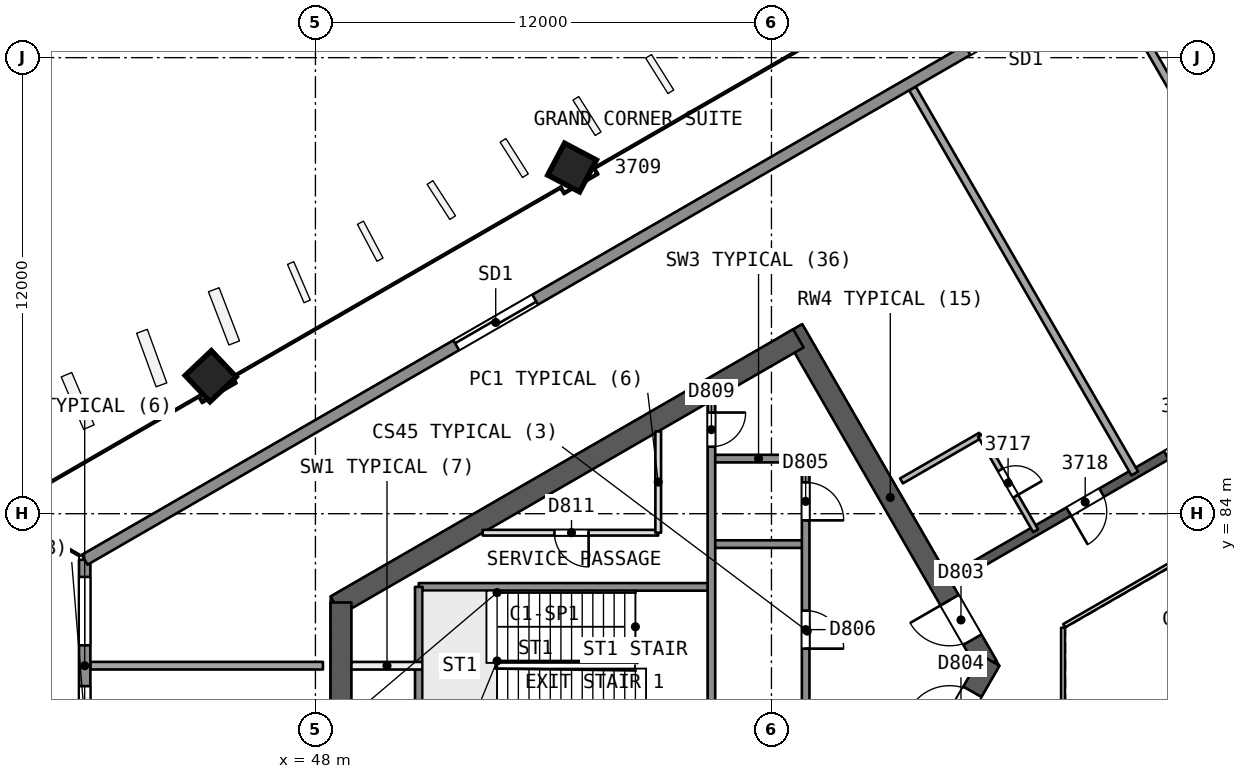
"""IFC4 building model, lengths in metres.
Left out: names, types, materials, properties, quantities, classifications, styles, units other than length and angle.
Written with IfcOpenShell. Run it as: python <this file> out.ifc"""

import sys

from ifc_helpers import new_model, si_unit, direction, frame, frame_2d, origin, origin_2d, place, context, subcontext, project, spatial, rectangle, extrude, element, fill, save


model = new_model("IFC4")
c1 = context("Model", 3, precision=1e-05, world=origin(), true_north=direction((0.0, 1.0)))
c2 = subcontext(c1, "Body", "Model", "MODEL_VIEW")
j1 = project(units=[si_unit("LENGTHUNIT", "METRE"), si_unit("PLANEANGLEUNIT", "RADIAN")], contexts=[c1])
p1 = place(None, origin())
s1 = spatial("IfcSite", under=j1, at=p1, CompositionType="ELEMENT")
p2 = place(p1, origin())
s2 = spatial("IfcBuilding", under=s1, at=p2, CompositionType="ELEMENT")
p3 = place(p2, frame((0.0, 0.0, 156.3)))
s3 = spatial("IfcBuildingStorey", under=s2, at=p3, CompositionType="ELEMENT", Elevation=156.3)
p4 = place(p3, frame((65.682, 80.0, 0.0), z_axis=(0.0, 0.0, 1.0), x_axis=(-0.500000202252, 0.866025287014, 0.0)))
e1 = element("IfcWall", 1, at=p4, inside=s3, PredefinedType="SHEAR", context=c2, shape_type="SweptSolid", body=[
    extrude(rectangle(XDim=10.221, YDim=0.55, at=frame_2d((5.111, 0.0))), origin(), (0.0, 0.0, 1.0), 3.7),
])
p5 = place(p4, frame((0.791, 0.0, 0.0)))
e2 = element("IfcOpeningElement", 2, at=p5, cuts=e1, PredefinedType="OPENING", context=c2, shape_type="SweptSolid", body=[
    extrude(rectangle(XDim=1.2, YDim=2.1, at=frame_2d((0.6, 1.05))), frame((0.0, 0.286, 0.0), z_axis=(0.0, -1.0, 0.0), x_axis=(1.0, 0.0, 0.0)), (0.0, 0.0, 1.0), 0.571),
])
p6 = place(p3, frame((60.709, 88.614, 0.0), z_axis=(0.0, 0.0, 1.0), x_axis=(-0.866020164116, -0.500009075263, 0.0)))
e3 = element("IfcWall", 3, at=p6, inside=s3, PredefinedType="SHEAR", context=c2, shape_type="SweptSolid", body=[
    extrude(rectangle(XDim=14.058, YDim=0.55, at=frame_2d((7.029, 0.0))), origin(), (0.0, 0.0, 1.0), 3.7),
])
p7 = place(p3, frame((48.672, 81.664, 0.0), z_axis=(0.0, 0.0, 1.0), x_axis=(0.0, -1.0, 0.0)))
e4 = element("IfcWall", 4, at=p7, inside=s3, PredefinedType="SHEAR", context=c2, shape_type="SweptSolid", body=[
    extrude(rectangle(XDim=3.487, YDim=0.55, at=frame_2d((1.743, 0.0))), origin(), (0.0, 0.0, 1.0), 3.7),
])
p8 = place(p3, frame((60.709, 71.386, 0.0), z_axis=(0.0, 0.0, 1.0), x_axis=(0.500015938302, 0.866016201606, 0.0)))
e5 = element("IfcWall", 5, at=p8, inside=s3, PredefinedType="SHEAR", context=c2, shape_type="SweptSolid", body=[
    extrude(rectangle(XDim=10.105, YDim=0.55, at=frame_2d((5.053, 0.0))), origin(), (0.0, 0.0, 1.0), 3.7),
])
p9 = place(p8, frame((7.955, 0.0, 0.0)))
e6 = element("IfcOpeningElement", 6, at=p9, cuts=e5, PredefinedType="OPENING", context=c2, shape_type="SweptSolid", body=[
    extrude(rectangle(XDim=1.2, YDim=2.1, at=frame_2d((0.6, 1.05))), frame((0.0, 0.286, 0.0), z_axis=(0.0, -1.0, 0.0), x_axis=(1.0, 0.0, 0.0)), (0.0, 0.0, 1.0), 0.571),
])
p10 = place(p3, frame((78.2, 90.046, 0.0), z_axis=(0.0, 0.0, 1.0), x_axis=(-0.866026492143, -0.499998114903, 0.0)))
e7 = element("IfcWall", 7, at=p10, inside=s3, PredefinedType="SHEAR", context=c2, shape_type="SweptSolid", body=[
    extrude(rectangle(XDim=15.588, YDim=0.25, at=frame_2d((7.794, 0.0))), origin(), (0.0, 0.0, 1.0), 3.25),
])
p11 = place(p10, frame((1.527, 0.0, 0.0)))
e8 = element("IfcOpeningElement", 8, at=p11, cuts=e7, PredefinedType="OPENING", context=c2, shape_type="SweptSolid", body=[
    extrude(rectangle(XDim=1.0, YDim=2.1, at=frame_2d((0.5, 1.05))), frame((0.0, 0.135, 0.0), z_axis=(0.0, -1.0, 0.0), x_axis=(1.0, 0.0, 0.0)), (0.0, 0.0, 1.0), 0.271),
])
p12 = place(p10, frame((7.915, 0.0, 0.0)))
e9 = element("IfcOpeningElement", 9, at=p12, cuts=e7, PredefinedType="OPENING", context=c2, shape_type="SweptSolid", body=[
    extrude(rectangle(XDim=1.1, YDim=2.1, at=frame_2d((0.55, 1.05))), frame((0.0, 0.135, 0.0), z_axis=(0.0, -1.0, 0.0), x_axis=(1.0, 0.0, 0.0)), (0.0, 0.0, 1.0), 0.271),
])
p13 = place(p10, frame((10.982, 0.0, 0.0)))
e10 = element("IfcOpeningElement", 10, at=p13, cuts=e7, PredefinedType="OPENING", context=c2, shape_type="SweptSolid", body=[
    extrude(rectangle(XDim=1.0, YDim=2.1, at=frame_2d((0.5, 1.05))), frame((0.0, 0.135, 0.0), z_axis=(0.0, -1.0, 0.0), x_axis=(1.0, 0.0, 0.0)), (0.0, 0.0, 1.0), 0.271),
])
p14 = place(p3, frame((54.73, 93.123, 0.0), z_axis=(0.019262573858, -0.012138060239, 0.999740776773), x_axis=(-0.498866616408, 0.866444929774, 0.020131634383)))
e11 = element("IfcColumn", 11, at=p14, inside=s3, PredefinedType="COLUMN", context=c2, shape_type="SweptSolid", body=[
    extrude(rectangle(XDim=0.95, YDim=0.95, at=origin_2d()), origin(), (0.0, 0.0, 1.0), 3.701),
])
p15 = place(p3, frame((45.209, 87.626, 0.0), z_axis=(0.02855911485, -0.006793507689, 0.999569019734), x_axis=(-0.50039805324, 0.86556025987, 0.020179812855)))
e12 = element("IfcColumn", 12, at=p15, inside=s3, PredefinedType="COLUMN", context=c2, shape_type="SweptSolid", body=[
    extrude(rectangle(XDim=0.95, YDim=0.95, at=origin_2d()), origin(), (0.0, 0.0, 1.0), 3.702),
])
for number, where, z_axis, x_axis in (
    (13, (68.839, 98.153, 0.0), (0.0, 0.0, 1.0), (0.5, -0.866, 0.0)),
    (14, (63.709, 95.191, 0.0), (0.0, 0.0, 1.0), (0.5, -0.866, 0.0)),
):
    element("IfcWall", number, at=place(p3, frame(where, z_axis=z_axis, x_axis=x_axis)), inside=s3, PredefinedType="PARTITIONING", context=c2, shape_type="SweptSolid", body=[
        extrude(rectangle(XDim=11.701, YDim=0.2, at=frame_2d((5.851, 0.0))), origin(), (0.0, 0.0, 1.0), 3.25),
    ])
p16 = place(p3, frame((63.422, 84.863, 0.0), z_axis=(0.0, 0.0, 1.0), x_axis=(0.865994240961, 0.500053971709, 0.0)))
e15 = element("IfcWall", 15, at=p16, inside=s3, PredefinedType="PARTITIONING", context=c2, shape_type="SweptSolid", body=[
    extrude(rectangle(XDim=2.401, YDim=0.15, at=frame_2d((1.201, 0.0))), origin(), (0.0, 0.0, 1.0), 3.25),
])
p17 = place(p3, frame((65.502, 86.063, 0.0), z_axis=(0.0, 0.0, 1.0), x_axis=(0.499987231761, -0.866032775405, 0.0)))
e16 = element("IfcWall", 16, at=p17, inside=s3, PredefinedType="PARTITIONING", context=c2, shape_type="SweptSolid", body=[
    extrude(rectangle(XDim=2.9, YDim=0.15, at=frame_2d((1.45, 0.0))), origin(), (0.0, 0.0, 1.0), 3.25),
])
p18 = place(p17, frame((1.05, 0.0, 0.0)))
e17 = element("IfcOpeningElement", 17, at=p18, cuts=e16, PredefinedType="OPENING", context=c2, shape_type="SweptSolid", body=[
    extrude(rectangle(XDim=0.8, YDim=2.1, at=frame_2d((0.4, 1.05))), frame((0.0, 0.085, 0.0), z_axis=(0.0, -1.0, 0.0), x_axis=(1.0, 0.0, 0.0)), (0.0, 0.0, 1.0), 0.171),
])
p19 = place(p3, frame((42.077, 80.001, 0.0), z_axis=(0.0, 0.0, 1.0), x_axis=(1.0, 0.0, 0.0)))
e18 = element("IfcWall", 18, at=p19, inside=s3, PredefinedType="PARTITIONING", context=c2, shape_type="SweptSolid", body=[
    extrude(rectangle(XDim=6.121, YDim=0.2, at=frame_2d((3.06, 0.0))), origin(), (0.0, 0.0, 1.0), 3.25),
])
p20 = place(p3, frame((41.928, 77.212, 0.0), z_axis=(0.0, 0.0, 1.0), x_axis=(0.0, 1.0, 0.0)))
e19 = element("IfcWall", 19, at=p20, inside=s3, PredefinedType="SOLIDWALL", context=c2, shape_type="SweptSolid", body=[
    extrude(rectangle(XDim=5.576, YDim=0.3, at=frame_2d((2.788, 0.0))), origin(), (0.0, 0.0, 1.0), 3.25),
])
p21 = place(p20, frame((0.451, 0.0, 0.9)))
e20 = element("IfcOpeningElement", 20, at=p21, cuts=e19, PredefinedType="OPENING", context=c2, shape_type="SweptSolid", body=[
    extrude(rectangle(XDim=1.8, YDim=1.5, at=frame_2d((0.9, 0.75))), frame((0.0, 0.161, 0.0), z_axis=(0.0, -1.0, 0.0), x_axis=(1.0, 0.0, 0.0)), (0.0, 0.0, 1.0), 0.321),
])
p22 = place(p20, frame((3.324, 0.0, 0.9)))
e21 = element("IfcOpeningElement", 21, at=p22, cuts=e19, PredefinedType="OPENING", context=c2, shape_type="SweptSolid", body=[
    extrude(rectangle(XDim=1.8, YDim=1.5, at=frame_2d((0.9, 0.75))), frame((0.0, 0.161, 0.0), z_axis=(0.0, -1.0, 0.0), x_axis=(1.0, 0.0, 0.0)), (0.0, 0.0, 1.0), 0.321),
])
p23 = place(p3, frame((41.928, 82.788, 0.0), z_axis=(0.0, 0.0, 1.0), x_axis=(0.866025629663, 0.499999608766, 0.0)))
e22 = element("IfcWall", 22, at=p23, inside=s3, PredefinedType="SOLIDWALL", context=c2, shape_type="SweptSolid", body=[
    extrude(rectangle(XDim=54.494, YDim=0.3, at=frame_2d((27.247, 0.0))), origin(), (0.0, 0.0, 1.0), 3.25),
])
p24 = place(p23, frame((26.826, 0.0, 0.0)))
e23 = element("IfcOpeningElement", 23, at=p24, cuts=e22, PredefinedType="OPENING", context=c2, shape_type="SweptSolid", body=[
    extrude(rectangle(XDim=2.4, YDim=2.4, at=frame_2d((1.2, 1.2))), frame((0.0, 0.161, 0.0), z_axis=(0.0, -1.0, 0.0), x_axis=(1.0, 0.0, 0.0)), (0.0, 0.0, 1.0), 0.321),
])
p25 = place(p23, frame((31.815, 0.0, 0.0)))
e24 = element("IfcOpeningElement", 24, at=p25, cuts=e22, PredefinedType="OPENING", context=c2, shape_type="SweptSolid", body=[
    extrude(rectangle(XDim=2.4, YDim=2.4, at=frame_2d((1.2, 1.2))), frame((0.0, 0.161, 0.0), z_axis=(0.0, -1.0, 0.0), x_axis=(1.0, 0.0, 0.0)), (0.0, 0.0, 1.0), 0.321),
])
p26 = place(p23, frame((42.339, 0.0, 0.0)))
e25 = element("IfcOpeningElement", 25, at=p26, cuts=e22, PredefinedType="OPENING", context=c2, shape_type="SweptSolid", body=[
    extrude(rectangle(XDim=2.4, YDim=2.4, at=frame_2d((1.2, 1.2))), frame((0.0, 0.161, 0.0), z_axis=(0.0, -1.0, 0.0), x_axis=(1.0, 0.0, 0.0)), (0.0, 0.0, 1.0), 0.321),
])
p27 = place(p23, frame((11.289, 0.0, 0.0)))
e26 = element("IfcOpeningElement", 26, at=p27, cuts=e22, PredefinedType="OPENING", context=c2, shape_type="SweptSolid", body=[
    extrude(rectangle(XDim=2.4, YDim=2.4, at=frame_2d((1.2, 1.2))), frame((0.0, 0.161, 0.0), z_axis=(0.0, -1.0, 0.0), x_axis=(1.0, 0.0, 0.0)), (0.0, 0.0, 1.0), 0.321),
])
p28 = place(p3, frame((60.9, 85.45, 0.0), z_axis=(0.0, 0.0, 1.0), x_axis=(-1.0, 0.0, 0.0)))
e27 = element("IfcWall", 27, at=p28, inside=s3, PredefinedType="SOLIDWALL", context=c2, shape_type="SweptSolid", body=[
    extrude(rectangle(XDim=2.48, YDim=0.2, at=frame_2d((1.24, 0.0))), origin(), (0.0, 0.0, 1.0), 3.25),
])
p29 = place(p3, frame((57.02, 83.5, 0.0), z_axis=(0.0, 0.0, 1.0), x_axis=(-1.0, 0.0, 0.0)))
e28 = element("IfcWall", 28, at=p29, inside=s3, PredefinedType="PARTITIONING", context=c2, shape_type="SweptSolid", body=[
    extrude(rectangle(XDim=4.618, YDim=0.15, at=frame_2d((2.309, 0.0))), origin(), (0.0, 0.0, 1.0), 3.25),
])
p30 = place(p29, frame((1.832, 0.0, 0.0)))
e29 = element("IfcOpeningElement", 29, at=p30, cuts=e28, PredefinedType="OPENING", context=c2, shape_type="SweptSolid", body=[
    extrude(rectangle(XDim=0.9, YDim=2.1, at=frame_2d((0.45, 1.05))), frame((0.0, 0.085, 0.0), z_axis=(0.0, -1.0, 0.0), x_axis=(1.0, 0.0, 0.0)), (0.0, 0.0, 1.0), 0.171),
])
p31 = place(p3, frame((60.9, 83.2, 0.0), z_axis=(0.0, 0.0, 1.0), x_axis=(-1.0, 0.0, 0.0)))
e30 = element("IfcWall", 30, at=p31, inside=s3, PredefinedType="SOLIDWALL", context=c2, shape_type="SweptSolid", body=[
    extrude(rectangle(XDim=2.48, YDim=0.2, at=frame_2d((1.24, 0.0))), origin(), (0.0, 0.0, 1.0), 3.25),
])
p32 = place(p3, frame((58.42, 82.075, 0.0), z_axis=(0.0, 0.0, 1.0), x_axis=(-1.0, 0.0, 0.0)))
e31 = element("IfcWall", 31, at=p32, inside=s3, PredefinedType="SOLIDWALL", context=c2, shape_type="SweptSolid", body=[
    extrude(rectangle(XDim=7.7, YDim=0.2, at=frame_2d((3.85, 0.0))), origin(), (0.0, 0.0, 1.0), 3.25),
])
p33 = place(p3, frame((50.82, 80.0, 0.0), z_axis=(0.0, 0.0, 1.0), x_axis=(-1.0, 0.0, 0.0)))
e32 = element("IfcWall", 32, at=p33, inside=s3, PredefinedType="PARTITIONING", context=c2, shape_type="SweptSolid", body=[
    extrude(rectangle(XDim=1.873, YDim=0.2, at=frame_2d((0.937, 0.0))), origin(), (0.0, 0.0, 1.0), 3.25),
])
p34 = place(p3, frame((60.9, 85.45, 0.0), z_axis=(0.0, 0.0, 1.0), x_axis=(0.0, -1.0, 0.0)))
e33 = element("IfcWall", 33, at=p34, inside=s3, PredefinedType="SOLIDWALL", context=c2, shape_type="SweptSolid", body=[
    extrude(rectangle(XDim=10.9, YDim=0.2, at=frame_2d((5.45, 0.0))), origin(), (0.0, 0.0, 1.0), 3.25),
])
p35 = place(p34, frame((0.625, 0.0, 0.0)))
e34 = element("IfcOpeningElement", 34, at=p35, cuts=e33, PredefinedType="OPENING", context=c2, shape_type="SweptSolid", body=[
    extrude(rectangle(XDim=1.0, YDim=2.1, at=frame_2d((0.5, 1.05))), frame((0.0, 0.11, 0.0), z_axis=(0.0, -1.0, 0.0), x_axis=(1.0, 0.0, 0.0)), (0.0, 0.0, 1.0), 0.221),
])
p36 = place(p34, frame((4.0, 0.0, 0.0)))
e35 = element("IfcOpeningElement", 35, at=p36, cuts=e33, PredefinedType="OPENING", context=c2, shape_type="SweptSolid", body=[
    extrude(rectangle(XDim=1.0, YDim=2.1, at=frame_2d((0.5, 1.05))), frame((0.0, 0.11, 0.0), z_axis=(0.0, -1.0, 0.0), x_axis=(1.0, 0.0, 0.0)), (0.0, 0.0, 1.0), 0.221),
])
p37 = place(p34, frame((7.375, 0.0, 0.0)))
e36 = element("IfcOpeningElement", 36, at=p37, cuts=e33, PredefinedType="OPENING", context=c2, shape_type="SweptSolid", body=[
    extrude(rectangle(XDim=1.0, YDim=2.1, at=frame_2d((0.5, 1.05))), frame((0.0, 0.11, 0.0), z_axis=(0.0, -1.0, 0.0), x_axis=(1.0, 0.0, 0.0)), (0.0, 0.0, 1.0), 0.221),
])
p38 = place(p3, frame((58.42, 86.974, 0.0), z_axis=(0.0, 0.0, 1.0), x_axis=(0.0, -1.0, 0.0)))
e37 = element("IfcWall", 37, at=p38, inside=s3, PredefinedType="SOLIDWALL", context=c2, shape_type="SweptSolid", body=[
    extrude(rectangle(XDim=10.524, YDim=0.2, at=frame_2d((5.262, 0.0))), origin(), (0.0, 0.0, 1.0), 3.25),
])
p39 = place(p38, frame((0.312, 0.0, 0.0)))
e38 = element("IfcOpeningElement", 38, at=p39, cuts=e37, PredefinedType="OPENING", context=c2, shape_type="SweptSolid", body=[
    extrude(rectangle(XDim=0.9, YDim=2.1, at=frame_2d((0.45, 1.05))), frame((0.0, 0.11, 0.0), z_axis=(0.0, -1.0, 0.0), x_axis=(1.0, 0.0, 0.0)), (0.0, 0.0, 1.0), 0.221),
])
p40 = place(p3, frame((57.02, 86.166, 0.0), z_axis=(0.0, 0.0, 1.0), x_axis=(0.0, -1.0, 0.0)))
e39 = element("IfcWall", 39, at=p40, inside=s3, PredefinedType="PARTITIONING", context=c2, shape_type="SweptSolid", body=[
    extrude(rectangle(XDim=2.666, YDim=0.15, at=frame_2d((1.333, 0.0))), origin(), (0.0, 0.0, 1.0), 3.25),
])
p41 = place(p3, frame((50.72, 82.075, 0.0), z_axis=(0.0, 0.0, 1.0), x_axis=(0.0, -1.0, 0.0)))
e40 = element("IfcWall", 40, at=p41, inside=s3, PredefinedType="SOLIDWALL", context=c2, shape_type="SweptSolid", body=[
    extrude(rectangle(XDim=4.15, YDim=0.2, at=frame_2d((2.075, 0.0))), origin(), (0.0, 0.0, 1.0), 3.25),
])
p42 = place(p3, frame((77.738, 86.846, 0.0), z_axis=(0.0, 0.0, 1.0), x_axis=(-0.866026658274, -0.499997827154, 0.0)))
e41 = element("IfcWall", 41, at=p42, inside=s3, PredefinedType="PARTITIONING", context=c2, shape_type="SweptSolid", body=[
    extrude(rectangle(XDim=11.588, YDim=0.1, at=frame_2d((5.794, 0.0))), origin(), (0.0, 0.0, 1.0), 3.25),
])
p43 = place(p3, frame((67.672, 81.0, 0.0), z_axis=(0.0, 0.0, 1.0), x_axis=(0.0, -1.0, 0.0)))
e42 = element("IfcWall", 42, at=p43, inside=s3, PredefinedType="PARTITIONING", context=c2, shape_type="SweptSolid", body=[
    extrude(rectangle(XDim=2.0, YDim=0.1, at=frame_2d((1.0, 0.0))), origin(), (0.0, 0.0, 1.0), 3.25),
])
p44 = place(p12, origin())
e43 = element("IfcDoor", 43, at=p44, inside=s3, OperationType="SINGLE_SWING_RIGHT", PredefinedType="NOTDEFINED", context=c2, shape_type="SweptSolid", body=[
    extrude(rectangle(XDim=1.1, YDim=2.1, at=frame_2d((0.55, 1.05))), frame((0.0, 0.025, 0.0), z_axis=(0.0, -1.0, 0.0), x_axis=(1.0, 0.0, 0.0)), (0.0, 0.0, 1.0), 0.05),
])
fill(e9, e43)
p45 = place(p18, origin())
e44 = element("IfcDoor", 44, at=p45, inside=s3, OperationType="SINGLE_SWING_RIGHT", PredefinedType="NOTDEFINED", context=c2, shape_type="SweptSolid", body=[
    extrude(rectangle(XDim=0.8, YDim=2.1, at=frame_2d((0.4, 1.05))), frame((0.0, 0.025, 0.0), z_axis=(0.0, -1.0, 0.0), x_axis=(1.0, 0.0, 0.0)), (0.0, 0.0, 1.0), 0.05),
])
fill(e17, e44)
p46 = place(p13, origin())
e45 = element("IfcDoor", 45, at=p46, inside=s3, OperationType="SINGLE_SWING_RIGHT", PredefinedType="NOTDEFINED", context=c2, shape_type="SweptSolid", body=[
    extrude(rectangle(XDim=1.0, YDim=2.1, at=frame_2d((0.5, 1.05))), frame((0.0, 0.025, 0.0), z_axis=(0.0, -1.0, 0.0), x_axis=(1.0, 0.0, 0.0)), (0.0, 0.0, 1.0), 0.05),
])
fill(e10, e45)
p47 = place(p21, origin())
e46 = element("IfcWindow", 46, at=p47, inside=s3, PartitioningType="SINGLE_PANEL", PredefinedType="WINDOW", context=c2, shape_type="SweptSolid", body=[
    extrude(rectangle(XDim=1.8, YDim=1.5, at=frame_2d((0.9, 0.75))), frame((0.0, 0.03, 0.0), z_axis=(0.0, -1.0, 0.0), x_axis=(1.0, 0.0, 0.0)), (0.0, 0.0, 1.0), 0.06),
])
fill(e20, e46)
p48 = place(p22, origin())
e47 = element("IfcWindow", 47, at=p48, inside=s3, PartitioningType="SINGLE_PANEL", PredefinedType="WINDOW", context=c2, shape_type="SweptSolid", body=[
    extrude(rectangle(XDim=1.8, YDim=1.5, at=frame_2d((0.9, 0.75))), frame((0.0, 0.03, 0.0), z_axis=(0.0, -1.0, 0.0), x_axis=(1.0, 0.0, 0.0)), (0.0, 0.0, 1.0), 0.06),
])
fill(e21, e47)
p49 = place(p27, origin())
e48 = element("IfcDoor", 48, at=p49, inside=s3, OperationType="SLIDING_TO_RIGHT", PredefinedType="NOTDEFINED", context=c2, shape_type="SweptSolid", body=[
    extrude(rectangle(XDim=2.4, YDim=2.4, at=frame_2d((1.2, 1.2))), frame((0.0, 0.025, 0.0), z_axis=(0.0, -1.0, 0.0), x_axis=(1.0, 0.0, 0.0)), (0.0, 0.0, 1.0), 0.05),
])
fill(e26, e48)
p50 = place(p5, origin())
e49 = element("IfcDoor", 49, at=p50, inside=s3, OperationType="SINGLE_SWING_RIGHT", PredefinedType="NOTDEFINED", context=c2, shape_type="SweptSolid", body=[
    extrude(rectangle(XDim=1.2, YDim=2.1, at=frame_2d((0.6, 1.05))), frame((0.0, 0.025, 0.0), z_axis=(0.0, -1.0, 0.0), x_axis=(1.0, 0.0, 0.0)), (0.0, 0.0, 1.0), 0.05),
])
fill(e2, e49)
p51 = place(p9, origin())
e50 = element("IfcDoor", 50, at=p51, inside=s3, OperationType="SINGLE_SWING_LEFT", PredefinedType="NOTDEFINED", context=c2, shape_type="SweptSolid", body=[
    extrude(rectangle(XDim=1.2, YDim=2.1, at=frame_2d((0.6, 1.05))), frame((0.0, 0.025, 0.0), z_axis=(0.0, -1.0, 0.0), x_axis=(1.0, 0.0, 0.0)), (0.0, 0.0, 1.0), 0.05),
])
fill(e6, e50)
p52 = place(p35, origin())
e51 = element("IfcDoor", 51, at=p52, inside=s3, OperationType="SINGLE_SWING_RIGHT", PredefinedType="NOTDEFINED", context=c2, shape_type="SweptSolid", body=[
    extrude(rectangle(XDim=1.0, YDim=2.1, at=frame_2d((0.5, 1.05))), frame((0.0, 0.025, 0.0), z_axis=(0.0, -1.0, 0.0), x_axis=(1.0, 0.0, 0.0)), (0.0, 0.0, 1.0), 0.05),
])
fill(e34, e51)
p53 = place(p36, origin())
e52 = element("IfcDoor", 52, at=p53, inside=s3, OperationType="SINGLE_SWING_RIGHT", PredefinedType="NOTDEFINED", context=c2, shape_type="SweptSolid", body=[
    extrude(rectangle(XDim=1.0, YDim=2.1, at=frame_2d((0.5, 1.05))), frame((0.0, 0.025, 0.0), z_axis=(0.0, -1.0, 0.0), x_axis=(1.0, 0.0, 0.0)), (0.0, 0.0, 1.0), 0.05),
])
fill(e35, e52)
p54 = place(p39, origin())
e53 = element("IfcDoor", 53, at=p54, inside=s3, OperationType="SINGLE_SWING_LEFT", PredefinedType="NOTDEFINED", context=c2, shape_type="SweptSolid", body=[
    extrude(rectangle(XDim=0.9, YDim=2.1, at=frame_2d((0.45, 1.05))), frame((0.0, 0.025, 0.0), z_axis=(0.0, -1.0, 0.0), x_axis=(1.0, 0.0, 0.0)), (0.0, 0.0, 1.0), 0.05),
])
fill(e38, e53)
p55 = place(p30, origin())
e54 = element("IfcDoor", 54, at=p55, inside=s3, OperationType="SINGLE_SWING_LEFT", PredefinedType="NOTDEFINED", context=c2, shape_type="SweptSolid", body=[
    extrude(rectangle(XDim=0.9, YDim=2.1, at=frame_2d((0.45, 1.05))), frame((0.0, 0.025, 0.0), z_axis=(0.0, -1.0, 0.0), x_axis=(1.0, 0.0, 0.0)), (0.0, 0.0, 1.0), 0.05),
])
fill(e29, e54)
save(model, sys.argv[1])
